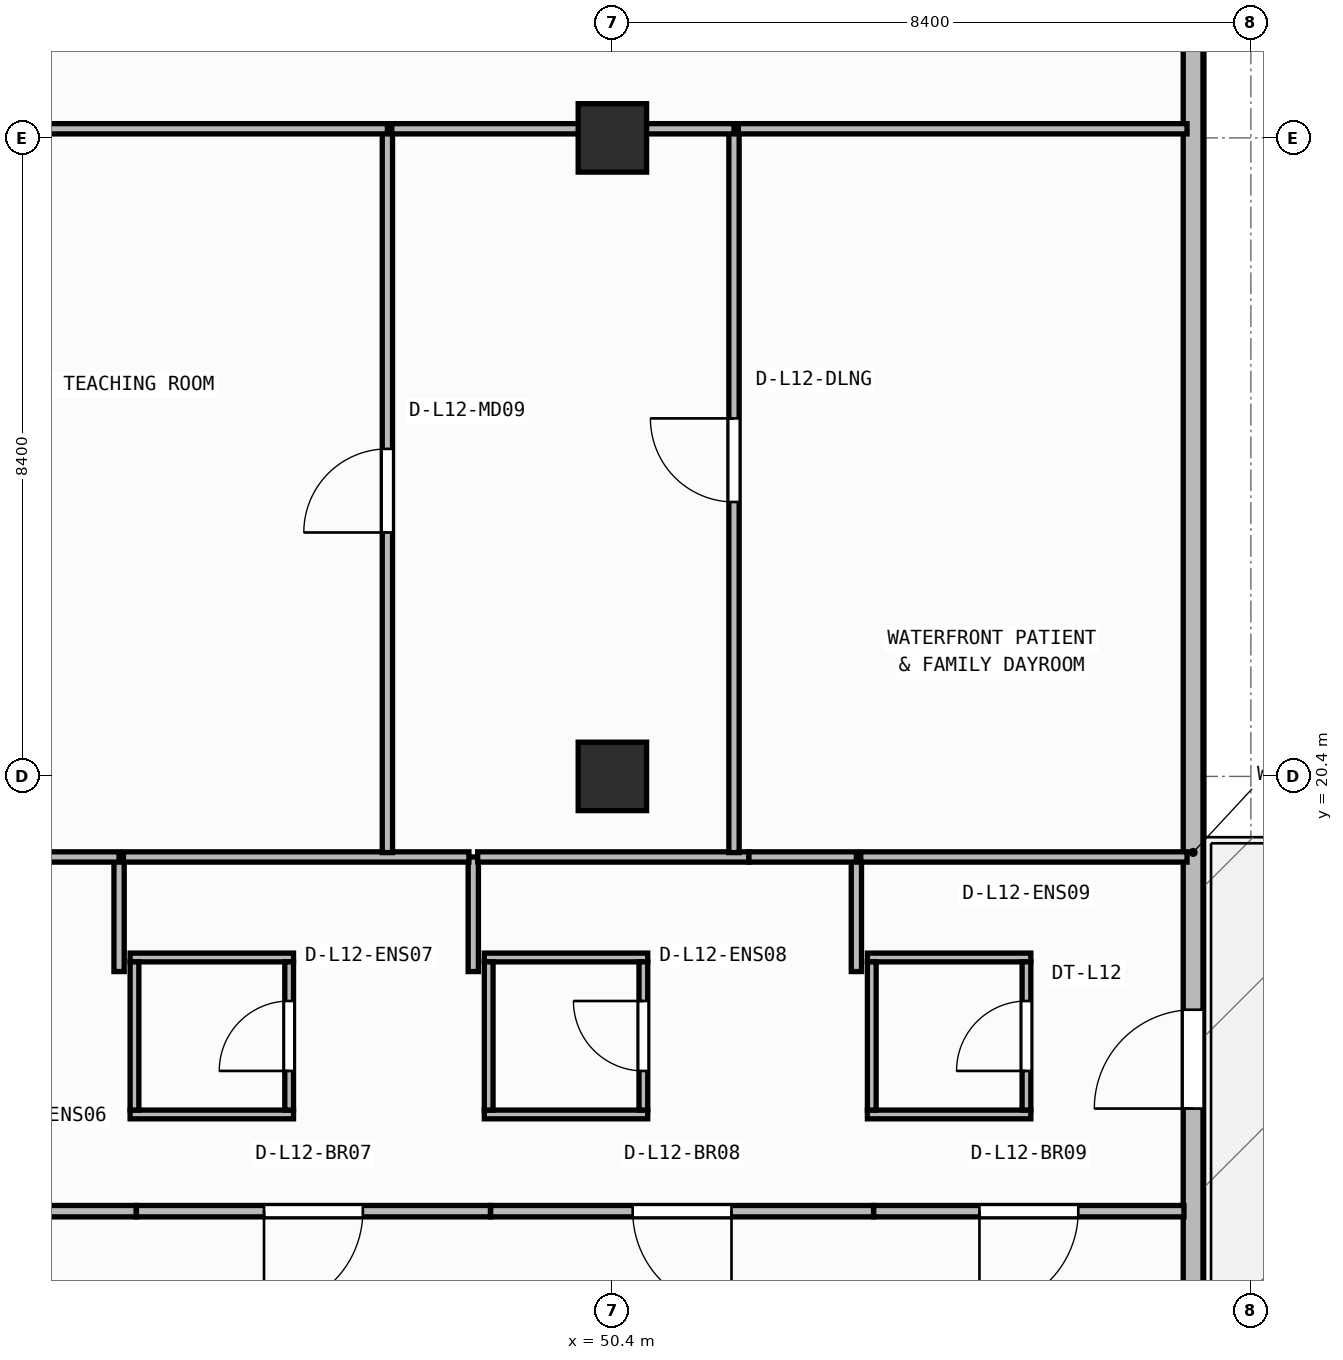
"""IFC4 building model, lengths in metres.
Left out: names, types, materials, properties, quantities, classifications, styles, units other than length and angle.
Written with IfcOpenShell. Run it as: python <this file> out.ifc"""

import sys

from ifc_helpers import new_model, si_unit, direction, frame, frame_2d, origin, origin_2d, place, context, subcontext, project, spatial, rectangle, extrude, element, fill, save


model = new_model("IFC4")
c1 = context("Model", 3, precision=1e-05, world=origin(), true_north=direction((0.0, 1.0)))
c2 = subcontext(c1, "Body", "Model", "MODEL_VIEW")
j1 = project(units=[si_unit("LENGTHUNIT", "METRE"), si_unit("PLANEANGLEUNIT", "RADIAN")], contexts=[c1])
p1 = place(None, origin())
s1 = spatial("IfcSite", under=j1, at=p1, CompositionType="ELEMENT")
p2 = place(p1, origin())
s2 = spatial("IfcBuilding", under=s1, at=p2, CompositionType="ELEMENT")
p3 = place(p2, frame((0.0, 0.0, 50.15)))
s3 = spatial("IfcBuildingStorey", under=s2, at=p3, CompositionType="ELEMENT", Elevation=50.15)
for number, where, z_axis, x_axis in (
    (1, (50.4, 20.4, 0.0), (0.0, 0.0, 1.0), (1.0, 0.0, 0.0)),
    (2, (50.4, 28.8, 0.0), (0.0, 0.0, 1.0), (1.0, 0.0, 0.0)),
):
    element("IfcColumn", number, at=place(p3, frame(where, z_axis=z_axis, x_axis=x_axis)), inside=s3, PredefinedType="COLUMN", context=c2, shape_type="SweptSolid", body=[
        extrude(rectangle(XDim=0.9, YDim=0.9, at=origin_2d()), origin(), (0.0, 0.0, 1.0), 3.95),
    ])
p4 = place(p3, frame((58.04, 7.16, 0.0), z_axis=(0.0, 0.0, 1.0), x_axis=(0.0, 1.0, 0.0)))
e3 = element("IfcWall", 3, at=p4, inside=s3, PredefinedType="STANDARD", context=c2, shape_type="SweptSolid", body=[
    extrude(rectangle(XDim=24.48, YDim=0.26, at=frame_2d((12.24, 0.0))), origin(), (0.0, 0.0, 1.0), 3.71),
])
p5 = place(p4, frame((8.87, 0.0, 0.0)))
e4 = element("IfcOpeningElement", 4, at=p5, cuts=e3, PredefinedType="OPENING", context=c2, shape_type="SweptSolid", body=[
    extrude(rectangle(XDim=1.3, YDim=2.15, at=frame_2d((0.65, 1.075))), frame((0.0, 0.14, 0.0), z_axis=(0.0, -1.0, 0.0), x_axis=(1.0, 0.0, 0.0)), (0.0, 0.0, 1.0), 0.28),
])
p6 = place(p3, frame((44.055, 15.952, 0.0), z_axis=(0.0, 0.0, 1.0), x_axis=(1.0, 0.0, 0.0)))
e5 = element("IfcWall", 5, at=p6, inside=s3, PredefinedType="PARTITIONING", context=c2, shape_type="SweptSolid", body=[
    extrude(rectangle(XDim=2.15, YDim=0.115, at=frame_2d((1.075, 0.0))), origin(), (0.0, 0.0, 1.0), 3.329),
])
p7 = place(p3, frame((44.055, 18.018, 0.0), z_axis=(0.0, 0.0, 1.0), x_axis=(1.0, 0.0, 0.0)))
e6 = element("IfcWall", 6, at=p7, inside=s3, PredefinedType="PARTITIONING", context=c2, shape_type="SweptSolid", body=[
    extrude(rectangle(XDim=2.15, YDim=0.115, at=frame_2d((1.075, 0.0))), origin(), (0.0, 0.0, 1.0), 3.71),
])
p8 = place(p3, frame((44.113, 16.01, 0.0), z_axis=(0.0, 0.0, 1.0), x_axis=(0.0, 1.0, 0.0)))
e7 = element("IfcWall", 7, at=p8, inside=s3, PredefinedType="PARTITIONING", context=c2, shape_type="SweptSolid", body=[
    extrude(rectangle(XDim=1.95, YDim=0.115, at=frame_2d((0.975, 0.0))), origin(), (0.0, 0.0, 1.0), 3.71),
])
p9 = place(p3, frame((46.147, 16.01, 0.0), z_axis=(0.0, 0.0, 1.0), x_axis=(0.0, 1.0, 0.0)))
e8 = element("IfcWall", 8, at=p9, inside=s3, PredefinedType="PARTITIONING", context=c2, shape_type="SweptSolid", body=[
    extrude(rectangle(XDim=1.95, YDim=0.115, at=frame_2d((0.975, 0.0))), origin(), (0.0, 0.0, 1.0), 3.71),
])
p10 = place(p9, frame((0.515, 0.0, 0.0)))
e9 = element("IfcOpeningElement", 9, at=p10, cuts=e8, PredefinedType="OPENING", context=c2, shape_type="SweptSolid", body=[
    extrude(rectangle(XDim=0.92, YDim=2.1, at=frame_2d((0.46, 1.05))), frame((0.0, 0.067, 0.0), z_axis=(0.0, -1.0, 0.0), x_axis=(1.0, 0.0, 0.0)), (0.0, 0.0, 1.0), 0.135),
])
p11 = place(p3, frame((48.715, 15.952, 0.0), z_axis=(0.0, 0.0, 1.0), x_axis=(1.0, 0.0, 0.0)))
e10 = element("IfcWall", 10, at=p11, inside=s3, PredefinedType="PARTITIONING", context=c2, shape_type="SweptSolid", body=[
    extrude(rectangle(XDim=2.15, YDim=0.115, at=frame_2d((1.075, 0.0))), origin(), (0.0, 0.0, 1.0), 3.329),
])
p12 = place(p3, frame((48.715, 18.018, 0.0), z_axis=(0.0, 0.0, 1.0), x_axis=(1.0, 0.0, 0.0)))
e11 = element("IfcWall", 11, at=p12, inside=s3, PredefinedType="PARTITIONING", context=c2, shape_type="SweptSolid", body=[
    extrude(rectangle(XDim=2.15, YDim=0.115, at=frame_2d((1.075, 0.0))), origin(), (0.0, 0.0, 1.0), 3.71),
])
p13 = place(p3, frame((48.772, 16.01, 0.0), z_axis=(0.0, 0.0, 1.0), x_axis=(0.0, 1.0, 0.0)))
e12 = element("IfcWall", 12, at=p13, inside=s3, PredefinedType="PARTITIONING", context=c2, shape_type="SweptSolid", body=[
    extrude(rectangle(XDim=1.95, YDim=0.115, at=frame_2d((0.975, 0.0))), origin(), (0.0, 0.0, 1.0), 3.71),
])
p14 = place(p3, frame((50.808, 16.01, 0.0), z_axis=(0.0, 0.0, 1.0), x_axis=(0.0, 1.0, 0.0)))
e13 = element("IfcWall", 13, at=p14, inside=s3, PredefinedType="PARTITIONING", context=c2, shape_type="SweptSolid", body=[
    extrude(rectangle(XDim=1.95, YDim=0.115, at=frame_2d((0.975, 0.0))), origin(), (0.0, 0.0, 1.0), 3.073),
])
p15 = place(p14, frame((0.515, 0.0, 0.0)))
e14 = element("IfcOpeningElement", 14, at=p15, cuts=e13, PredefinedType="OPENING", context=c2, shape_type="SweptSolid", body=[
    extrude(rectangle(XDim=0.92, YDim=2.1, at=frame_2d((0.46, 1.05))), frame((0.0, 0.067, 0.0), z_axis=(0.0, -1.0, 0.0), x_axis=(1.0, 0.0, 0.0)), (0.0, 0.0, 1.0), 0.135),
])
for number, where, z_axis, x_axis in (
    (15, (53.755, 15.952, 0.0), (0.0, 0.0, 1.0), (1.0, 0.0, 0.0)),
    (16, (53.755, 18.018, 0.0), (0.0, 0.0, 1.0), (1.0, 0.0, 0.0)),
):
    element("IfcWall", number, at=place(p3, frame(where, z_axis=z_axis, x_axis=x_axis)), inside=s3, PredefinedType="PARTITIONING", context=c2, shape_type="SweptSolid", body=[
        extrude(rectangle(XDim=2.15, YDim=0.115, at=frame_2d((1.075, 0.0))), origin(), (0.0, 0.0, 1.0), 3.71),
    ])
p16 = place(p3, frame((53.812, 16.01, 0.0), z_axis=(0.0, 0.0, 1.0), x_axis=(0.0, 1.0, 0.0)))
e17 = element("IfcWall", 17, at=p16, inside=s3, PredefinedType="PARTITIONING", context=c2, shape_type="SweptSolid", body=[
    extrude(rectangle(XDim=1.95, YDim=0.115, at=frame_2d((0.975, 0.0))), origin(), (0.0, 0.0, 1.0), 3.71),
])
p17 = place(p3, frame((55.847, 16.01, 0.0), z_axis=(0.0, 0.0, 1.0), x_axis=(0.0, 1.0, 0.0)))
e18 = element("IfcWall", 18, at=p17, inside=s3, PredefinedType="PARTITIONING", context=c2, shape_type="SweptSolid", body=[
    extrude(rectangle(XDim=1.95, YDim=0.115, at=frame_2d((0.975, 0.0))), origin(), (0.0, 0.0, 1.0), 3.71),
])
p18 = place(p17, frame((0.515, 0.0, 0.0)))
e19 = element("IfcOpeningElement", 19, at=p18, cuts=e18, PredefinedType="OPENING", context=c2, shape_type="SweptSolid", body=[
    extrude(rectangle(XDim=0.92, YDim=2.1, at=frame_2d((0.46, 1.05))), frame((0.0, 0.067, 0.0), z_axis=(0.0, -1.0, 0.0), x_axis=(1.0, 0.0, 0.0)), (0.0, 0.0, 1.0), 0.135),
])
p19 = place(p3, frame((44.136, 14.68, 0.0), z_axis=(0.0, 0.0, 1.0), x_axis=(-1.0, 0.0, 0.0)))
e20 = element("IfcWall", 20, at=p19, inside=s3, PredefinedType="PARTITIONING", context=c2, shape_type="SweptSolid", body=[
    extrude(rectangle(XDim=4.288, YDim=0.15, at=frame_2d((2.144, 0.0))), origin(), (0.0, 0.0, 1.0), 3.71),
])
p20 = place(p19, frame((1.494, 0.0, 0.0)))
e21 = element("IfcOpeningElement", 21, at=p20, cuts=e20, PredefinedType="OPENING", context=c2, shape_type="SweptSolid", body=[
    extrude(rectangle(XDim=1.3, YDim=2.15, at=frame_2d((0.65, 1.075))), frame((0.0, 0.085, 0.0), z_axis=(0.0, -1.0, 0.0), x_axis=(1.0, 0.0, 0.0)), (0.0, 0.0, 1.0), 0.17),
])
p21 = place(p3, frame((48.796, 14.68, 0.0), z_axis=(0.0, 0.0, 1.0), x_axis=(-1.0, 0.0, 0.0)))
e22 = element("IfcWall", 22, at=p21, inside=s3, PredefinedType="PARTITIONING", context=c2, shape_type="SweptSolid", body=[
    extrude(rectangle(XDim=4.658, YDim=0.15, at=frame_2d((2.329, 0.0))), origin(), (0.0, 0.0, 1.0), 3.71),
])
p22 = place(p21, frame((1.679, 0.0, 0.0)))
e23 = element("IfcOpeningElement", 23, at=p22, cuts=e22, PredefinedType="OPENING", context=c2, shape_type="SweptSolid", body=[
    extrude(rectangle(XDim=1.3, YDim=2.15, at=frame_2d((0.65, 1.075))), frame((0.0, 0.085, 0.0), z_axis=(0.0, -1.0, 0.0), x_axis=(1.0, 0.0, 0.0)), (0.0, 0.0, 1.0), 0.17),
])
p23 = place(p3, frame((53.836, 14.68, 0.0), z_axis=(0.0, 0.0, 1.0), x_axis=(-1.0, 0.0, 0.0)))
e24 = element("IfcWall", 24, at=p23, inside=s3, PredefinedType="PARTITIONING", context=c2, shape_type="SweptSolid", body=[
    extrude(rectangle(XDim=5.038, YDim=0.15, at=frame_2d((2.519, 0.0))), origin(), (0.0, 0.0, 1.0), 3.71),
])
p24 = place(p23, frame((1.869, 0.0, 0.0)))
e25 = element("IfcOpeningElement", 25, at=p24, cuts=e24, PredefinedType="OPENING", context=c2, shape_type="SweptSolid", body=[
    extrude(rectangle(XDim=1.3, YDim=2.15, at=frame_2d((0.65, 1.075))), frame((0.0, 0.085, 0.0), z_axis=(0.0, -1.0, 0.0), x_axis=(1.0, 0.0, 0.0)), (0.0, 0.0, 1.0), 0.17),
])
p25 = place(p3, frame((57.92, 14.68, 0.0), z_axis=(0.0, 0.0, 1.0), x_axis=(-1.0, 0.0, 0.0)))
e26 = element("IfcWall", 26, at=p25, inside=s3, PredefinedType="PARTITIONING", context=c2, shape_type="SweptSolid", body=[
    extrude(rectangle(XDim=4.082, YDim=0.15, at=frame_2d((2.041, 0.0))), origin(), (0.0, 0.0, 1.0), 3.71),
])
p26 = place(p25, frame((1.391, 0.0, 0.0)))
e27 = element("IfcOpeningElement", 27, at=p26, cuts=e26, PredefinedType="OPENING", context=c2, shape_type="SweptSolid", body=[
    extrude(rectangle(XDim=1.3, YDim=2.15, at=frame_2d((0.65, 1.075))), frame((0.0, 0.085, 0.0), z_axis=(0.0, -1.0, 0.0), x_axis=(1.0, 0.0, 0.0)), (0.0, 0.0, 1.0), 0.17),
])
p27 = place(p3, frame((43.91, 17.833, 0.0), z_axis=(0.0, 0.0, 1.0), x_axis=(0.0, 1.0, 0.0)))
e28 = element("IfcWall", 28, at=p27, inside=s3, PredefinedType="PARTITIONING", context=c2, shape_type="SweptSolid", body=[
    extrude(rectangle(XDim=1.508, YDim=0.135, at=frame_2d((0.754, 0.0))), origin(), (0.0, 0.0, 1.0), 3.71),
])
p28 = place(p3, frame((43.91, 19.34, 0.0), z_axis=(0.0, 0.0, 1.0), x_axis=(-1.0, 0.0, 0.0)))
e29 = element("IfcWall", 29, at=p28, inside=s3, PredefinedType="PARTITIONING", context=c2, shape_type="SweptSolid", body=[
    extrude(rectangle(XDim=4.232, YDim=0.135, at=frame_2d((2.116, 0.0))), origin(), (0.0, 0.0, 1.0), 3.71),
])
p29 = place(p3, frame((48.57, 17.833, 0.0), z_axis=(0.0, 0.0, 1.0), x_axis=(0.0, 1.0, 0.0)))
e30 = element("IfcWall", 30, at=p29, inside=s3, PredefinedType="PARTITIONING", context=c2, shape_type="SweptSolid", body=[
    extrude(rectangle(XDim=1.508, YDim=0.135, at=frame_2d((0.754, 0.0))), origin(), (0.0, 0.0, 1.0), 3.71),
])
p30 = place(p3, frame((48.512, 19.34, 0.0), z_axis=(0.0, 0.0, 1.0), x_axis=(-1.0, 0.0, 0.0)))
e31 = element("IfcWall", 31, at=p30, inside=s3, PredefinedType="PARTITIONING", context=c2, shape_type="SweptSolid", body=[
    extrude(rectangle(XDim=4.545, YDim=0.135, at=frame_2d((2.272, 0.0))), origin(), (0.0, 0.0, 1.0), 3.71),
])
p31 = place(p3, frame((53.61, 17.833, 0.0), z_axis=(0.0, 0.0, 1.0), x_axis=(0.0, 1.0, 0.0)))
e32 = element("IfcWall", 32, at=p31, inside=s3, PredefinedType="PARTITIONING", context=c2, shape_type="SweptSolid", body=[
    extrude(rectangle(XDim=1.508, YDim=0.135, at=frame_2d((0.754, 0.0))), origin(), (0.0, 0.0, 1.0), 3.71),
])
p32 = place(p3, frame((52.195, 19.34, 0.0), z_axis=(0.0, 0.0, 1.0), x_axis=(-1.0, 0.0, 0.0)))
e33 = element("IfcWall", 33, at=p32, inside=s3, PredefinedType="PARTITIONING", context=c2, shape_type="SweptSolid", body=[
    extrude(rectangle(XDim=3.567, YDim=0.135, at=frame_2d((1.784, 0.0))), origin(), (0.0, 0.0, 1.0), 3.71),
])
p33 = place(p3, frame((53.61, 19.34, 0.0), z_axis=(0.0, 0.0, 1.0), x_axis=(-1.0, 0.0, 0.0)))
e34 = element("IfcWall", 34, at=p33, inside=s3, PredefinedType="PARTITIONING", context=c2, shape_type="SweptSolid", body=[
    extrude(rectangle(XDim=1.414, YDim=0.135, at=frame_2d((0.707, 0.0))), origin(), (0.0, 0.0, 1.0), 3.71),
])
p34 = place(p3, frame((57.96, 19.34, 0.0), z_axis=(0.0, 0.0, 1.0), x_axis=(-1.0, 0.0, 0.0)))
e35 = element("IfcWall", 35, at=p34, inside=s3, PredefinedType="PARTITIONING", context=c2, shape_type="SweptSolid", body=[
    extrude(rectangle(XDim=4.292, YDim=0.135, at=frame_2d((2.146, 0.0))), origin(), (0.0, 0.0, 1.0), 3.71),
])
p35 = place(p3, frame((47.44, 19.397, 0.0), z_axis=(0.0, 0.0, 1.0), x_axis=(0.0, 1.0, 0.0)))
e36 = element("IfcWall", 36, at=p35, inside=s3, PredefinedType="PARTITIONING", context=c2, shape_type="SweptSolid", body=[
    extrude(rectangle(XDim=9.522, YDim=0.135, at=frame_2d((4.761, 0.0))), origin(), (0.0, 0.0, 1.0), 3.71),
])
p36 = place(p35, frame((4.211, 0.0, 0.0)))
e37 = element("IfcOpeningElement", 37, at=p36, cuts=e36, PredefinedType="OPENING", context=c2, shape_type="SweptSolid", body=[
    extrude(rectangle(XDim=1.1, YDim=2.1, at=frame_2d((0.55, 1.05))), frame((0.0, 0.077, 0.0), z_axis=(0.0, -1.0, 0.0), x_axis=(1.0, 0.0, 0.0)), (0.0, 0.0, 1.0), 0.155),
])
p37 = place(p3, frame((47.44, 28.92, 0.0), z_axis=(0.0, 0.0, 1.0), x_axis=(-1.0, 0.0, 0.0)))
e38 = element("IfcWall", 38, at=p37, inside=s3, PredefinedType="PARTITIONING", context=c2, shape_type="SweptSolid", body=[
    extrude(rectangle(XDim=9.373, YDim=0.135, at=frame_2d((4.686, 0.0))), origin(), (0.0, 0.0, 1.0), 3.073),
])
p38 = place(p3, frame((52.0, 19.397, 0.0), z_axis=(0.0, 0.0, 1.0), x_axis=(0.0, 1.0, 0.0)))
e39 = element("IfcWall", 39, at=p38, inside=s3, PredefinedType="PARTITIONING", context=c2, shape_type="SweptSolid", body=[
    extrude(rectangle(XDim=9.522, YDim=0.135, at=frame_2d((4.761, 0.0))), origin(), (0.0, 0.0, 1.0), 3.71),
])
p39 = place(p38, frame((4.612, 0.0, 0.0)))
e40 = element("IfcOpeningElement", 40, at=p39, cuts=e39, PredefinedType="OPENING", context=c2, shape_type="SweptSolid", body=[
    extrude(rectangle(XDim=1.1, YDim=2.1, at=frame_2d((0.55, 1.05))), frame((0.0, 0.077, 0.0), z_axis=(0.0, -1.0, 0.0), x_axis=(1.0, 0.0, 0.0)), (0.0, 0.0, 1.0), 0.155),
])
p40 = place(p3, frame((52.0, 28.92, 0.0), z_axis=(0.0, 0.0, 1.0), x_axis=(-1.0, 0.0, 0.0)))
e41 = element("IfcWall", 41, at=p40, inside=s3, PredefinedType="PARTITIONING", context=c2, shape_type="SweptSolid", body=[
    extrude(rectangle(XDim=4.502, YDim=0.135, at=frame_2d((2.251, 0.0))), origin(), (0.0, 0.0, 1.0), 3.073),
])
p41 = place(p3, frame((57.96, 28.92, 0.0), z_axis=(0.0, 0.0, 1.0), x_axis=(-1.0, 0.0, 0.0)))
e42 = element("IfcWall", 42, at=p41, inside=s3, PredefinedType="PARTITIONING", context=c2, shape_type="SweptSolid", body=[
    extrude(rectangle(XDim=5.902, YDim=0.135, at=frame_2d((2.951, 0.0))), origin(), (0.0, 0.0, 1.0), 3.71),
])
p42 = place(p5, origin())
e43 = element("IfcDoor", 43, at=p42, inside=s3, OperationType="SINGLE_SWING_LEFT", PredefinedType="DOOR", context=c2, shape_type="SweptSolid", body=[
    extrude(rectangle(XDim=1.3, YDim=2.15, at=frame_2d((0.65, 1.075))), frame((0.0, 0.025, 0.0), z_axis=(0.0, -1.0, 0.0), x_axis=(1.0, 0.0, 0.0)), (0.0, 0.0, 1.0), 0.05),
])
fill(e4, e43)
p43 = place(p10, origin())
e44 = element("IfcDoor", 44, at=p43, inside=s3, OperationType="SINGLE_SWING_LEFT", PredefinedType="DOOR", context=c2, shape_type="SweptSolid", body=[
    extrude(rectangle(XDim=0.92, YDim=2.1, at=frame_2d((0.46, 1.05))), frame((0.0, 0.025, 0.0), z_axis=(0.0, -1.0, 0.0), x_axis=(1.0, 0.0, 0.0)), (0.0, 0.0, 1.0), 0.05),
])
fill(e9, e44)
p44 = place(p15, origin())
e45 = element("IfcDoor", 45, at=p44, inside=s3, OperationType="SINGLE_SWING_RIGHT", PredefinedType="DOOR", context=c2, shape_type="SweptSolid", body=[
    extrude(rectangle(XDim=0.92, YDim=2.1, at=frame_2d((0.46, 1.05))), frame((0.0, 0.025, 0.0), z_axis=(0.0, -1.0, 0.0), x_axis=(1.0, 0.0, 0.0)), (0.0, 0.0, 1.0), 0.05),
])
fill(e14, e45)
p45 = place(p18, origin())
e46 = element("IfcDoor", 46, at=p45, inside=s3, OperationType="SINGLE_SWING_LEFT", PredefinedType="DOOR", context=c2, shape_type="SweptSolid", body=[
    extrude(rectangle(XDim=0.92, YDim=2.1, at=frame_2d((0.46, 1.05))), frame((0.0, 0.025, 0.0), z_axis=(0.0, -1.0, 0.0), x_axis=(1.0, 0.0, 0.0)), (0.0, 0.0, 1.0), 0.05),
])
fill(e19, e46)
p46 = place(p22, origin())
e47 = element("IfcDoor", 47, at=p46, inside=s3, OperationType="SINGLE_SWING_RIGHT", PredefinedType="DOOR", context=c2, shape_type="SweptSolid", body=[
    extrude(rectangle(XDim=1.3, YDim=2.15, at=frame_2d((0.65, 1.075))), frame((0.0, 0.025, 0.0), z_axis=(0.0, -1.0, 0.0), x_axis=(1.0, 0.0, 0.0)), (0.0, 0.0, 1.0), 0.05),
])
fill(e23, e47)
p47 = place(p24, origin())
e48 = element("IfcDoor", 48, at=p47, inside=s3, OperationType="SINGLE_SWING_LEFT", PredefinedType="DOOR", context=c2, shape_type="SweptSolid", body=[
    extrude(rectangle(XDim=1.3, YDim=2.15, at=frame_2d((0.65, 1.075))), frame((0.0, 0.025, 0.0), z_axis=(0.0, -1.0, 0.0), x_axis=(1.0, 0.0, 0.0)), (0.0, 0.0, 1.0), 0.05),
])
fill(e25, e48)
p48 = place(p26, origin())
e49 = element("IfcDoor", 49, at=p48, inside=s3, OperationType="SINGLE_SWING_RIGHT", PredefinedType="DOOR", context=c2, shape_type="SweptSolid", body=[
    extrude(rectangle(XDim=1.3, YDim=2.15, at=frame_2d((0.65, 1.075))), frame((0.0, 0.025, 0.0), z_axis=(0.0, -1.0, 0.0), x_axis=(1.0, 0.0, 0.0)), (0.0, 0.0, 1.0), 0.05),
])
fill(e27, e49)
p49 = place(p36, origin())
e50 = element("IfcDoor", 50, at=p49, inside=s3, OperationType="SINGLE_SWING_LEFT", PredefinedType="DOOR", context=c2, shape_type="SweptSolid", body=[
    extrude(rectangle(XDim=1.1, YDim=2.1, at=frame_2d((0.55, 1.05))), frame((0.0, 0.025, 0.0), z_axis=(0.0, -1.0, 0.0), x_axis=(1.0, 0.0, 0.0)), (0.0, 0.0, 1.0), 0.05),
])
fill(e37, e50)
p50 = place(p39, origin())
e51 = element("IfcDoor", 51, at=p50, inside=s3, OperationType="SINGLE_SWING_RIGHT", PredefinedType="DOOR", context=c2, shape_type="SweptSolid", body=[
    extrude(rectangle(XDim=1.1, YDim=2.1, at=frame_2d((0.55, 1.05))), frame((0.0, 0.025, 0.0), z_axis=(0.0, -1.0, 0.0), x_axis=(1.0, 0.0, 0.0)), (0.0, 0.0, 1.0), 0.05),
])
fill(e40, e51)
save(model, sys.argv[1])
